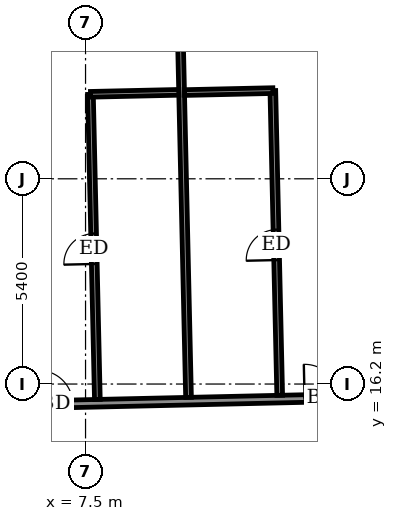
"""IFC4 building model, lengths in metres.
Left out: names, types, materials, properties, quantities, classifications, styles, units other than length and angle.
Written with IfcOpenShell. Run it as: python <this file> out.ifc"""

import sys

from ifc_helpers import new_model, si_unit, direction, frame, frame_2d, origin, place, context, subcontext, project, spatial, rectangle, extrude, element, fill, save


model = new_model("IFC4")
c1 = context("Model", 3, precision=1e-05, world=origin(), true_north=direction((0.0, 1.0)))
c2 = subcontext(c1, "Body", "Model", "MODEL_VIEW")
j1 = project(units=[si_unit("LENGTHUNIT", "METRE"), si_unit("PLANEANGLEUNIT", "RADIAN")], contexts=[c1])
p1 = place(None, origin())
s1 = spatial("IfcSite", under=j1, at=p1, CompositionType="ELEMENT")
p2 = place(p1, origin())
s2 = spatial("IfcBuilding", under=s1, at=p2, CompositionType="ELEMENT")
p3 = place(p2, frame((0.0, 0.0, 287.1)))
s3 = spatial("IfcBuildingStorey", under=s2, at=p3, CompositionType="ELEMENT", Elevation=287.1)
p4 = place(p3, frame((-26.401, 14.918, 0.0), z_axis=(0.0, 0.0, 1.0), x_axis=(0.99974239733, 0.022696673341, 0.0)))
e1 = element("IfcWall", 1, at=p4, inside=s3, PredefinedType="PARTITIONING", context=c2, shape_type="SweptSolid", body=[
    extrude(rectangle(XDim=55.386, YDim=0.2, at=frame_2d((27.693, 0.0))), origin(), (0.0, 0.0, 1.0), 3.05),
])
p5 = place(p4, frame((52.889, 0.0, 0.0)))
e2 = element("IfcOpeningElement", 2, at=p5, cuts=e1, PredefinedType="OPENING", context=c2, shape_type="SweptSolid", body=[
    extrude(rectangle(XDim=1.0, YDim=2.1, at=frame_2d((0.5, 1.05))), frame((0.0, 0.11, 0.0), z_axis=(0.0, -1.0, 0.0), x_axis=(1.0, 0.0, 0.0)), (0.0, 0.0, 1.0), 0.22),
])
p6 = place(p4, frame((48.6, 0.0, 0.0)))
e3 = element("IfcOpeningElement", 3, at=p6, cuts=e1, PredefinedType="OPENING", context=c2, shape_type="SweptSolid", body=[
    extrude(rectangle(XDim=0.9, YDim=2.1, at=frame_2d((0.45, 1.05))), frame((0.0, 0.11, 0.0), z_axis=(0.0, -1.0, 0.0), x_axis=(1.0, 0.0, 0.0)), (0.0, 0.0, 1.0), 0.22),
])
p7 = place(p4, frame((41.8, 0.0, 0.0)))
e4 = element("IfcOpeningElement", 4, at=p7, cuts=e1, PredefinedType="OPENING", context=c2, shape_type="SweptSolid", body=[
    extrude(rectangle(XDim=0.9, YDim=2.1, at=frame_2d((0.45, 1.05))), frame((0.0, 0.11, 0.0), z_axis=(0.0, -1.0, 0.0), x_axis=(1.0, 0.0, 0.0)), (0.0, 0.0, 1.0), 0.22),
])
p8 = place(p4, frame((39.675, 0.0, 0.0)))
e5 = element("IfcOpeningElement", 5, at=p8, cuts=e1, PredefinedType="OPENING", context=c2, shape_type="SweptSolid", body=[
    extrude(rectangle(XDim=0.9, YDim=2.1, at=frame_2d((0.45, 1.05))), frame((0.0, 0.11, 0.0), z_axis=(0.0, -1.0, 0.0), x_axis=(1.0, 0.0, 0.0)), (0.0, 0.0, 1.0), 0.22),
])
p9 = place(p4, frame((32.675, 0.0, 0.0)))
e6 = element("IfcOpeningElement", 6, at=p9, cuts=e1, PredefinedType="OPENING", context=c2, shape_type="SweptSolid", body=[
    extrude(rectangle(XDim=0.9, YDim=2.1, at=frame_2d((0.45, 1.05))), frame((0.0, 0.11, 0.0), z_axis=(0.0, -1.0, 0.0), x_axis=(1.0, 0.0, 0.0)), (0.0, 0.0, 1.0), 0.22),
])
p10 = place(p4, frame((30.4, 0.0, 0.0)))
e7 = element("IfcOpeningElement", 7, at=p10, cuts=e1, PredefinedType="OPENING", context=c2, shape_type="SweptSolid", body=[
    extrude(rectangle(XDim=0.9, YDim=2.1, at=frame_2d((0.45, 1.05))), frame((0.0, 0.11, 0.0), z_axis=(0.0, -1.0, 0.0), x_axis=(1.0, 0.0, 0.0)), (0.0, 0.0, 1.0), 0.22),
])
p11 = place(p4, frame((23.225, 0.0, 0.0)))
e8 = element("IfcOpeningElement", 8, at=p11, cuts=e1, PredefinedType="OPENING", context=c2, shape_type="SweptSolid", body=[
    extrude(rectangle(XDim=0.9, YDim=2.1, at=frame_2d((0.45, 1.05))), frame((0.0, 0.11, 0.0), z_axis=(0.0, -1.0, 0.0), x_axis=(1.0, 0.0, 0.0)), (0.0, 0.0, 1.0), 0.22),
])
p12 = place(p4, frame((20.9, 0.0, 0.0)))
e9 = element("IfcOpeningElement", 9, at=p12, cuts=e1, PredefinedType="OPENING", context=c2, shape_type="SweptSolid", body=[
    extrude(rectangle(XDim=0.9, YDim=2.1, at=frame_2d((0.45, 1.05))), frame((0.0, 0.11, 0.0), z_axis=(0.0, -1.0, 0.0), x_axis=(1.0, 0.0, 0.0)), (0.0, 0.0, 1.0), 0.22),
])
p13 = place(p4, frame((13.9, 0.0, 0.0)))
e10 = element("IfcOpeningElement", 10, at=p13, cuts=e1, PredefinedType="OPENING", context=c2, shape_type="SweptSolid", body=[
    extrude(rectangle(XDim=0.9, YDim=2.1, at=frame_2d((0.45, 1.05))), frame((0.0, 0.11, 0.0), z_axis=(0.0, -1.0, 0.0), x_axis=(1.0, 0.0, 0.0)), (0.0, 0.0, 1.0), 0.22),
])
p14 = place(p4, frame((11.775, 0.0, 0.0)))
e11 = element("IfcOpeningElement", 11, at=p14, cuts=e1, PredefinedType="OPENING", context=c2, shape_type="SweptSolid", body=[
    extrude(rectangle(XDim=0.9, YDim=2.1, at=frame_2d((0.45, 1.05))), frame((0.0, 0.11, 0.0), z_axis=(0.0, -1.0, 0.0), x_axis=(1.0, 0.0, 0.0)), (0.0, 0.0, 1.0), 0.22),
])
p15 = place(p4, frame((1.65, 0.0, 0.0)))
e12 = element("IfcOpeningElement", 12, at=p15, cuts=e1, PredefinedType="OPENING", context=c2, shape_type="SweptSolid", body=[
    extrude(rectangle(XDim=1.0, YDim=2.1, at=frame_2d((0.5, 1.05))), frame((0.0, 0.11, 0.0), z_axis=(0.0, -1.0, 0.0), x_axis=(1.0, 0.0, 0.0)), (0.0, 0.0, 1.0), 0.22),
])
p16 = place(p4, frame((7.025, 0.0, 0.0)))
e13 = element("IfcOpeningElement", 13, at=p16, cuts=e1, PredefinedType="OPENING", context=c2, shape_type="SweptSolid", body=[
    extrude(rectangle(XDim=0.9, YDim=2.1, at=frame_2d((0.45, 1.05))), frame((0.0, 0.11, 0.0), z_axis=(0.0, -1.0, 0.0), x_axis=(1.0, 0.0, 0.0)), (0.0, 0.0, 1.0), 0.22),
])
p17 = place(p3, frame((7.811, 15.795, 0.0), z_axis=(0.0, 0.0, 1.0), x_axis=(-0.022683416553, 0.999742698205, 0.0)))
e14 = element("IfcWall", 14, at=p17, inside=s3, PredefinedType="PARTITIONING", context=c2, shape_type="SweptSolid", body=[
    extrude(rectangle(XDim=8.029, YDim=0.15, at=frame_2d((4.015, 0.0))), origin(), (0.0, 0.0, 1.0), 3.05),
])
p18 = place(p17, frame((3.565, 0.0, 0.0)))
e15 = element("IfcOpeningElement", 15, at=p18, cuts=e14, PredefinedType="OPENING", context=c2, shape_type="SweptSolid", body=[
    extrude(rectangle(XDim=0.8, YDim=2.1, at=frame_2d((0.4, 1.05))), frame((0.0, 0.085, 0.0), z_axis=(0.0, -1.0, 0.0), x_axis=(1.0, 0.0, 0.0)), (0.0, 0.0, 1.0), 0.17),
])
p19 = place(p3, frame((10.21, 15.849, 0.0), z_axis=(0.0, 0.0, 1.0), x_axis=(-0.022661475803, 0.999743195783, 0.0)))
e16 = element("IfcWall", 16, at=p19, inside=s3, PredefinedType="PARTITIONING", context=c2, shape_type="SweptSolid", body=[
    extrude(rectangle(XDim=12.4, YDim=0.15, at=frame_2d((6.2, 0.0))), origin(), (0.0, 0.0, 1.0), 2.5),
])
p20 = place(p3, frame((12.609, 15.903, 0.0), z_axis=(0.0, 0.0, 1.0), x_axis=(-0.022557518047, 0.999745546817, 0.0)))
e17 = element("IfcWall", 17, at=p20, inside=s3, PredefinedType="PARTITIONING", context=c2, shape_type="SweptSolid", body=[
    extrude(rectangle(XDim=8.02, YDim=0.15, at=frame_2d((4.01, 0.0))), origin(), (0.0, 0.0, 1.0), 3.05),
])
p21 = place(p20, frame((3.56, 0.0, 0.0)))
e18 = element("IfcOpeningElement", 18, at=p21, cuts=e17, PredefinedType="OPENING", context=c2, shape_type="SweptSolid", body=[
    extrude(rectangle(XDim=0.8, YDim=2.1, at=frame_2d((0.4, 1.05))), frame((0.0, 0.085, 0.0), z_axis=(0.0, -1.0, 0.0), x_axis=(1.0, 0.0, 0.0)), (0.0, 0.0, 1.0), 0.17),
])
p22 = place(p3, frame((10.105, 23.869, 0.0), z_axis=(0.0, 0.0, 1.0), x_axis=(0.999749954681, 0.022361308448, 0.0)))
e19 = element("IfcWall", 19, at=p22, inside=s3, PredefinedType="PARTITIONING", context=c2, shape_type="SweptSolid", body=[
    extrude(rectangle(XDim=2.325, YDim=0.15, at=frame_2d((1.163, 0.0))), origin(), (0.0, 0.0, 1.0), 3.05),
])
p23 = place(p3, frame((7.631, 23.823, 0.0), z_axis=(0.0, 0.0, 1.0), x_axis=(0.999749744571, 0.022370700241, 0.0)))
e20 = element("IfcWall", 20, at=p23, inside=s3, PredefinedType="PARTITIONING", context=c2, shape_type="SweptSolid", body=[
    extrude(rectangle(XDim=2.324, YDim=0.15, at=frame_2d((1.162, 0.0))), origin(), (0.0, 0.0, 1.0), 3.05),
])
p24 = place(p8, origin())
e21 = element("IfcDoor", 21, at=p24, inside=s3, OperationType="SINGLE_SWING_RIGHT", PredefinedType="DOOR", context=c2, shape_type="SweptSolid", body=[
    extrude(rectangle(XDim=0.9, YDim=2.1, at=frame_2d((0.45, 1.05))), frame((0.0, 0.025, 0.0), z_axis=(0.0, -1.0, 0.0), x_axis=(1.0, 0.0, 0.0)), (0.0, 0.0, 1.0), 0.05),
])
fill(e5, e21)
p25 = place(p21, origin())
e22 = element("IfcDoor", 22, at=p25, inside=s3, OperationType="SINGLE_SWING_RIGHT", PredefinedType="DOOR", context=c2, shape_type="SweptSolid", body=[
    extrude(rectangle(XDim=0.8, YDim=2.1, at=frame_2d((0.4, 1.05))), frame((0.0, 0.025, 0.0), z_axis=(0.0, -1.0, 0.0), x_axis=(1.0, 0.0, 0.0)), (0.0, 0.0, 1.0), 0.05),
])
fill(e18, e22)
p26 = place(p9, origin())
e23 = element("IfcDoor", 23, at=p26, inside=s3, OperationType="SINGLE_SWING_LEFT", PredefinedType="DOOR", context=c2, shape_type="SweptSolid", body=[
    extrude(rectangle(XDim=0.9, YDim=2.1, at=frame_2d((0.45, 1.05))), frame((0.0, 0.025, 0.0), z_axis=(0.0, -1.0, 0.0), x_axis=(1.0, 0.0, 0.0)), (0.0, 0.0, 1.0), 0.05),
])
fill(e6, e23)
p27 = place(p18, origin())
e24 = element("IfcDoor", 24, at=p27, inside=s3, OperationType="SINGLE_SWING_LEFT", PredefinedType="DOOR", context=c2, shape_type="SweptSolid", body=[
    extrude(rectangle(XDim=0.8, YDim=2.1, at=frame_2d((0.4, 1.05))), frame((0.0, 0.025, 0.0), z_axis=(0.0, -1.0, 0.0), x_axis=(1.0, 0.0, 0.0)), (0.0, 0.0, 1.0), 0.05),
])
fill(e15, e24)
save(model, sys.argv[1])
